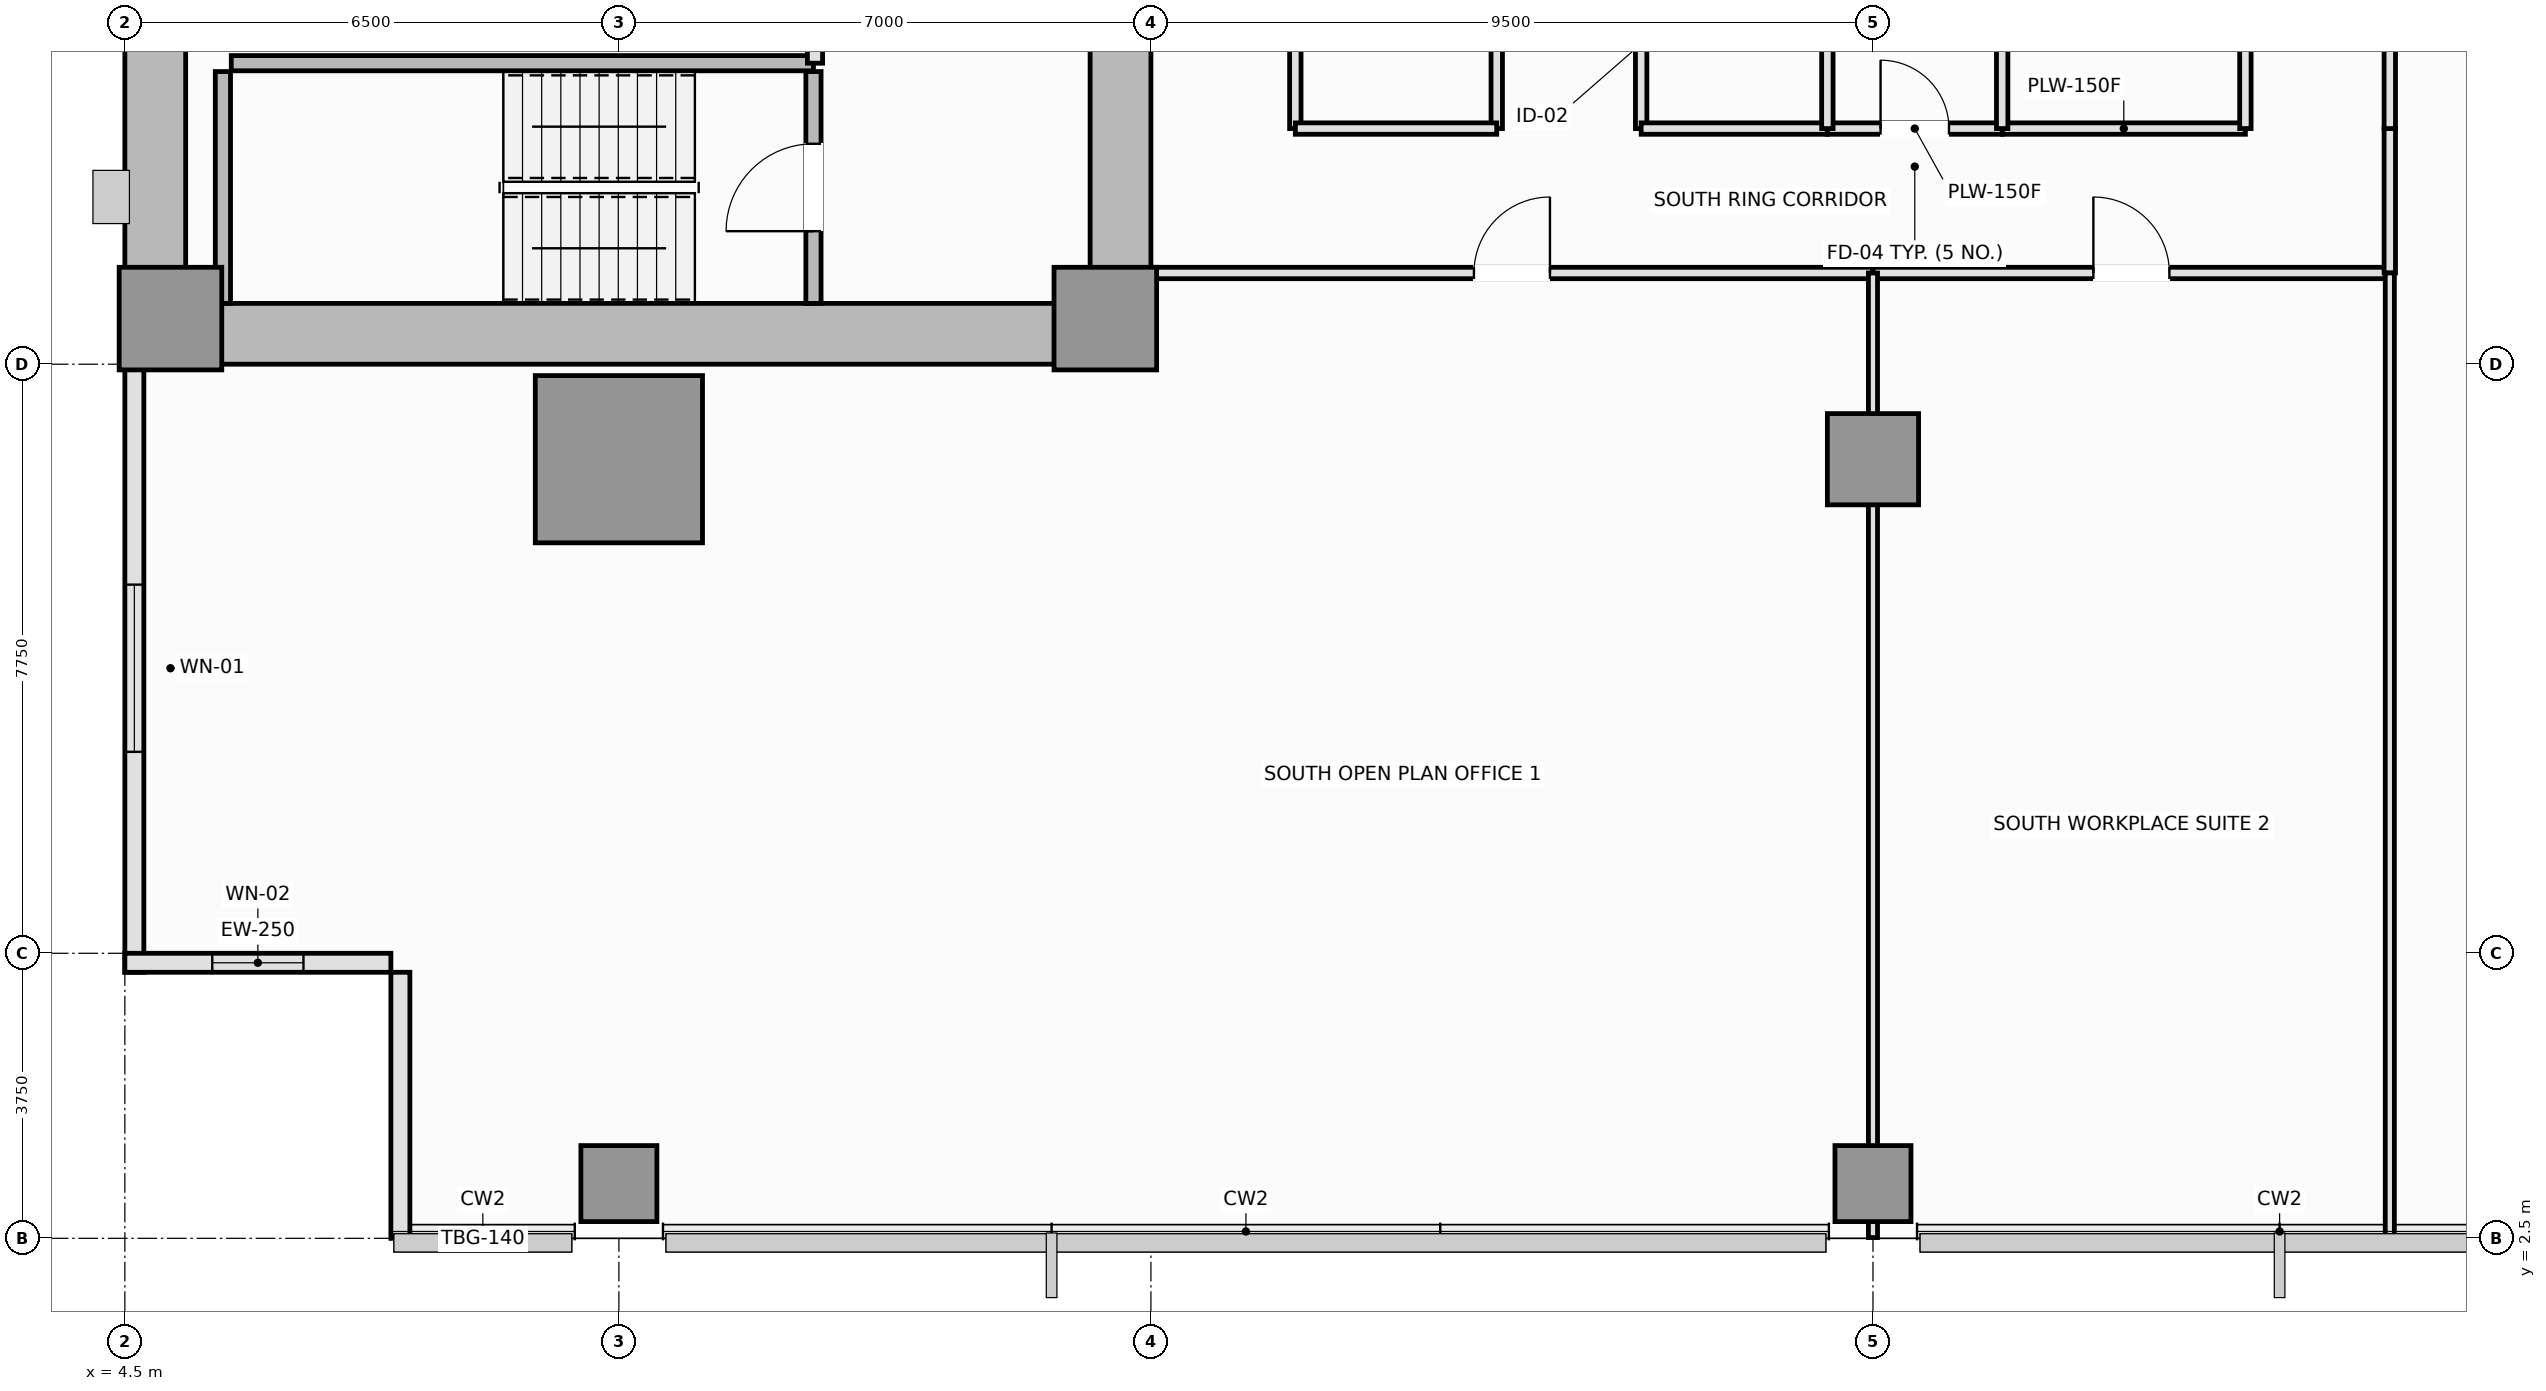
"""IFC4 building model, lengths in metres.
Left out: names, types, materials, properties, quantities, classifications, styles, units other than length and angle.
Written with IfcOpenShell. Run it as: python <this file> out.ifc"""

import sys

from ifc_helpers import new_model, si_unit, direction, frame, frame_2d, origin, origin_2d, place, context, subcontext, project, spatial, rectangle, extrude, element, fill, save


model = new_model("IFC4")
c1 = context("Model", 3, precision=1e-05, world=origin(), true_north=direction((0.0, 1.0)))
c2 = subcontext(c1, "Body", "Model", "MODEL_VIEW")
j1 = project(units=[si_unit("LENGTHUNIT", "METRE"), si_unit("PLANEANGLEUNIT", "RADIAN")], contexts=[c1])
p1 = place(None, origin())
s1 = spatial("IfcSite", under=j1, at=p1, CompositionType="ELEMENT")
p2 = place(p1, origin())
s2 = spatial("IfcBuilding", under=s1, at=p2, CompositionType="ELEMENT")
p3 = place(p2, frame((0.0, 0.0, 39.8)))
s3 = spatial("IfcBuildingStorey", under=s2, at=p3, CompositionType="ELEMENT", Elevation=39.8)
p4 = place(p3, frame((4.5, 14.4, 0.0), z_axis=(0.0, 0.0, 1.0), x_axis=(1.0, 0.0, 0.0)))
e1 = element("IfcWall", 1, at=p4, inside=s3, PredefinedType="SHEAR", context=c2, shape_type="SweptSolid", body=[
    extrude(rectangle(XDim=13.5, YDim=0.8, at=frame_2d((6.75, 0.0))), origin(), (0.0, 0.0, 1.0), 3.55),
])
p5 = place(p3, frame((4.9, 14.8, 0.0), z_axis=(0.0, 0.0, 1.0), x_axis=(0.0, 1.0, 0.0)))
e2 = element("IfcWall", 2, at=p5, inside=s3, PredefinedType="SHEAR", context=c2, shape_type="SweptSolid", body=[
    extrude(rectangle(XDim=20.9, YDim=0.8, at=frame_2d((10.45, 0.0))), origin(), (0.0, 0.0, 1.0), 3.55),
])
p6 = place(p3, frame((17.6, 14.8, 0.0), z_axis=(0.0, 0.0, 1.0), x_axis=(0.0, 1.0, 0.0)))
e3 = element("IfcWall", 3, at=p6, inside=s3, PredefinedType="SHEAR", context=c2, shape_type="SweptSolid", body=[
    extrude(rectangle(XDim=8.65, YDim=0.8, at=frame_2d((4.325, 0.0))), origin(), (0.0, 0.0, 1.0), 3.55),
])
p7 = place(p6, frame((4.1, 0.0, 0.0)))
e4 = element("IfcOpeningElement", 4, at=p7, cuts=e3, PredefinedType="OPENING", context=c2, shape_type="SweptSolid", body=[
    extrude(rectangle(XDim=1.1, YDim=2.15, at=frame_2d((0.55, 1.075))), frame((0.0, 0.41, 0.0), z_axis=(0.0, -1.0, 0.0), x_axis=(1.0, 0.0, 0.0)), (0.0, 0.0, 1.0), 0.82),
])
for number, where, z_axis, x_axis in (
    (5, (5.1, 14.6, 0.0), (0.0, 0.0, 1.0), (1.0, 0.0, 0.0)),
    (6, (17.4, 14.6, 0.0), (0.0, 0.0, 1.0), (1.0, 0.0, 0.0)),
):
    element("IfcColumn", number, at=place(p3, frame(where, z_axis=z_axis, x_axis=x_axis)), inside=s3, PredefinedType="PILASTER", context=c2, shape_type="SweptSolid", body=[
        extrude(rectangle(XDim=1.35, YDim=1.35, at=origin_2d()), origin(), (0.0, 0.0, 1.0), 3.55),
    ])
p8 = place(p3, frame((11.0, 12.75, 0.0), z_axis=(0.0, 0.0, 1.0), x_axis=(1.0, 0.0, 0.0)))
e7 = element("IfcColumn", 7, at=p8, inside=s3, PredefinedType="COLUMN", context=c2, shape_type="SweptSolid", body=[
    extrude(rectangle(XDim=2.2, YDim=2.2, at=origin_2d()), origin(), (0.0, 0.0, 1.0), 3.55),
])
p9 = place(p3, frame((27.5, 12.75, 0.0), z_axis=(0.0, 0.0, 1.0), x_axis=(1.0, 0.0, 0.0)))
e8 = element("IfcColumn", 8, at=p9, inside=s3, PredefinedType="COLUMN", context=c2, shape_type="SweptSolid", body=[
    extrude(rectangle(XDim=1.2, YDim=1.2, at=origin_2d()), origin(), (0.0, 0.0, 1.0), 3.55),
])
for number, where, z_axis, x_axis in (
    (9, (11.0, 3.22, 0.0), (0.0, 0.0, 1.0), (1.0, 0.0, 0.0)),
    (10, (27.5, 3.22, 0.0), (0.0, 0.0, 1.0), (1.0, 0.0, 0.0)),
):
    element("IfcColumn", number, at=place(p3, frame(where, z_axis=z_axis, x_axis=x_axis)), inside=s3, PredefinedType="COLUMN", context=c2, shape_type="SweptSolid", body=[
        extrude(rectangle(XDim=1.0, YDim=1.0, at=origin_2d()), origin(), (0.0, 0.0, 1.0), 3.55),
    ])
p10 = place(p3, frame((4.625, 14.0, 0.0), z_axis=(0.0, 0.0, 1.0), x_axis=(0.0, -1.0, 0.0)))
e11 = element("IfcWall", 11, at=p10, inside=s3, PredefinedType="SOLIDWALL", context=c2, shape_type="SweptSolid", body=[
    extrude(rectangle(XDim=8.0, YDim=0.25, at=frame_2d((4.0, 0.0))), origin(), (0.0, 0.0, 1.0), 3.37),
])
p11 = place(p10, frame((2.9, 0.0, 0.9)))
e12 = element("IfcOpeningElement", 12, at=p11, cuts=e11, PredefinedType="OPENING", context=c2, shape_type="SweptSolid", body=[
    extrude(rectangle(XDim=2.2, YDim=1.8, at=frame_2d((1.1, 0.9))), frame((0.0, 0.135, 0.0), z_axis=(0.0, -1.0, 0.0), x_axis=(1.0, 0.0, 0.0)), (0.0, 0.0, 1.0), 0.27),
])
p12 = place(p3, frame((4.5, 6.125, 0.0), z_axis=(0.0, 0.0, 1.0), x_axis=(1.0, 0.0, 0.0)))
e13 = element("IfcWall", 13, at=p12, inside=s3, PredefinedType="SOLIDWALL", context=c2, shape_type="SweptSolid", body=[
    extrude(rectangle(XDim=3.5, YDim=0.25, at=frame_2d((1.75, 0.0))), origin(), (0.0, 0.0, 1.0), 3.37),
])
p13 = place(p12, frame((1.15, 0.0, 0.9)))
e14 = element("IfcOpeningElement", 14, at=p13, cuts=e13, PredefinedType="OPENING", context=c2, shape_type="SweptSolid", body=[
    extrude(rectangle(XDim=1.2, YDim=1.8, at=frame_2d((0.6, 0.9))), frame((0.0, 0.135, 0.0), z_axis=(0.0, -1.0, 0.0), x_axis=(1.0, 0.0, 0.0)), (0.0, 0.0, 1.0), 0.27),
])
p14 = place(p3, frame((8.125, 6.0, 0.0), z_axis=(0.0, 0.0, 1.0), x_axis=(0.0, -1.0, 0.0)))
e15 = element("IfcWall", 15, at=p14, inside=s3, PredefinedType="SOLIDWALL", context=c2, shape_type="SweptSolid", body=[
    extrude(rectangle(XDim=3.5, YDim=0.25, at=frame_2d((1.75, 0.0))), origin(), (0.0, 0.0, 1.0), 3.37),
])
p15 = place(p3, frame((5.79, 14.8, 0.0), z_axis=(0.0, 0.0, 1.0), x_axis=(0.0, 1.0, 0.0)))
e16 = element("IfcWall", 16, at=p15, inside=s3, PredefinedType="SOLIDWALL", context=c2, shape_type="SweptSolid", body=[
    extrude(rectangle(XDim=3.05, YDim=0.2, at=frame_2d((1.525, 0.0))), origin(), (0.0, 0.0, 1.0), 3.55),
])
p16 = place(p3, frame((5.9, 17.96, 0.0), z_axis=(0.0, 0.0, 1.0), x_axis=(1.0, 0.0, 0.0)))
e17 = element("IfcWall", 17, at=p16, inside=s3, PredefinedType="SOLIDWALL", context=c2, shape_type="SweptSolid", body=[
    extrude(rectangle(XDim=7.66, YDim=0.2, at=frame_2d((3.83, 0.0))), origin(), (0.0, 0.0, 1.0), 3.55),
])
p17 = place(p3, frame((13.56, 14.8, 0.0), z_axis=(0.0, 0.0, 1.0), x_axis=(0.0, 1.0, 0.0)))
e18 = element("IfcWall", 18, at=p17, inside=s3, PredefinedType="SOLIDWALL", context=c2, shape_type="SweptSolid", body=[
    extrude(rectangle(XDim=3.05, YDim=0.2, at=frame_2d((1.525, 0.0))), origin(), (0.0, 0.0, 1.0), 3.55),
])
p18 = place(p17, frame((0.95, 0.0, 0.0)))
e19 = element("IfcOpeningElement", 19, at=p18, cuts=e18, PredefinedType="OPENING", context=c2, shape_type="SweptSolid", body=[
    extrude(rectangle(XDim=1.15, YDim=2.15, at=frame_2d((0.575, 1.075))), frame((0.0, 0.11, 0.0), z_axis=(0.0, -1.0, 0.0), x_axis=(1.0, 0.0, 0.0)), (0.0, 0.0, 1.0), 0.22),
])
p19 = place(p3, frame((13.58, 17.96, 0.0), z_axis=(0.0, 0.0, 1.0), x_axis=(0.0, 1.0, 0.0)))
e20 = element("IfcWall", 20, at=p19, inside=s3, PredefinedType="PARTITIONING", context=c2, shape_type="SweptSolid", body=[
    extrude(rectangle(XDim=0.54, YDim=0.2, at=frame_2d((0.27, 0.0))), origin(), (0.0, 0.0, 1.0), 3.37),
])
p20 = place(p3, frame((22.55, 17.1, 0.0), z_axis=(0.0, 0.0, 1.0), x_axis=(0.0, 1.0, 0.0)))
e21 = element("IfcWall", 21, at=p20, inside=s3, PredefinedType="PARTITIONING", context=c2, shape_type="SweptSolid", body=[
    extrude(rectangle(XDim=3.65, YDim=0.15, at=frame_2d((1.825, 0.0))), origin(), (0.0, 0.0, 1.0), 3.01),
])
p21 = place(p20, frame((1.325, 0.0, 0.0)))
e22 = element("IfcOpeningElement", 22, at=p21, cuts=e21, PredefinedType="OPENING", context=c2, shape_type="SweptSolid", body=[
    extrude(rectangle(XDim=1.0, YDim=2.15, at=frame_2d((0.5, 1.075))), frame((0.0, 0.085, 0.0), z_axis=(0.0, -1.0, 0.0), x_axis=(1.0, 0.0, 0.0)), (0.0, 0.0, 1.0), 0.17),
])
p22 = place(p3, frame((24.45, 17.1, 0.0), z_axis=(0.0, 0.0, 1.0), x_axis=(0.0, 1.0, 0.0)))
e23 = element("IfcWall", 23, at=p22, inside=s3, PredefinedType="PARTITIONING", context=c2, shape_type="SweptSolid", body=[
    extrude(rectangle(XDim=3.1, YDim=0.15, at=frame_2d((1.55, 0.0))), origin(), (0.0, 0.0, 1.0), 3.37),
])
p23 = place(p22, frame((1.05, 0.0, 0.0)))
e24 = element("IfcOpeningElement", 24, at=p23, cuts=e23, PredefinedType="OPENING", context=c2, shape_type="SweptSolid", body=[
    extrude(rectangle(XDim=1.0, YDim=2.15, at=frame_2d((0.5, 1.075))), frame((0.0, 0.085, 0.0), z_axis=(0.0, -1.0, 0.0), x_axis=(1.0, 0.0, 0.0)), (0.0, 0.0, 1.0), 0.17),
])
p24 = place(p3, frame((19.9, 17.1, 0.0), z_axis=(0.0, 0.0, 1.0), x_axis=(0.0, 1.0, 0.0)))
e25 = element("IfcWall", 25, at=p24, inside=s3, PredefinedType="PARTITIONING", context=c2, shape_type="SweptSolid", body=[
    extrude(rectangle(XDim=3.65, YDim=0.15, at=frame_2d((1.825, 0.0))), origin(), (0.0, 0.0, 1.0), 3.37),
])
p25 = place(p3, frame((19.9, 17.1, 0.0), z_axis=(0.0, 0.0, 1.0), x_axis=(1.0, 0.0, 0.0)))
e26 = element("IfcWall", 26, at=p25, inside=s3, PredefinedType="PARTITIONING", context=c2, shape_type="SweptSolid", body=[
    extrude(rectangle(XDim=2.65, YDim=0.15, at=frame_2d((1.325, 0.0))), origin(), (0.0, 0.0, 1.0), 3.37),
])
p26 = place(p3, frame((29.2, 17.1, 0.0), z_axis=(0.0, 0.0, 1.0), x_axis=(1.0, 0.0, 0.0)))
e27 = element("IfcWall", 27, at=p26, inside=s3, PredefinedType="PLUMBINGWALL", context=c2, shape_type="SweptSolid", body=[
    extrude(rectangle(XDim=3.2, YDim=0.15, at=frame_2d((1.6, 0.0))), origin(), (0.0, 0.0, 1.0), 3.37),
])
p27 = place(p3, frame((26.9, 17.1, 0.0), z_axis=(0.0, 0.0, 1.0), x_axis=(1.0, 0.0, 0.0)))
e28 = element("IfcWall", 28, at=p27, inside=s3, PredefinedType="PLUMBINGWALL", context=c2, shape_type="SweptSolid", body=[
    extrude(rectangle(XDim=2.3, YDim=0.15, at=frame_2d((1.15, 0.0))), origin(), (0.0, 0.0, 1.0), 3.37),
])
p28 = place(p27, frame((0.7, 0.0, 0.0)))
e29 = element("IfcOpeningElement", 29, at=p28, cuts=e28, PredefinedType="OPENING", context=c2, shape_type="SweptSolid", body=[
    extrude(rectangle(XDim=0.9, YDim=2.1, at=frame_2d((0.45, 1.05))), frame((0.0, 0.085, 0.0), z_axis=(0.0, -1.0, 0.0), x_axis=(1.0, 0.0, 0.0)), (0.0, 0.0, 1.0), 0.17),
])
p29 = place(p3, frame((24.45, 17.1, 0.0), z_axis=(0.0, 0.0, 1.0), x_axis=(1.0, 0.0, 0.0)))
e30 = element("IfcWall", 30, at=p29, inside=s3, PredefinedType="PARTITIONING", context=c2, shape_type="SweptSolid", body=[
    extrude(rectangle(XDim=2.45, YDim=0.15, at=frame_2d((1.225, 0.0))), origin(), (0.0, 0.0, 1.0), 3.37),
])
p30 = place(p3, frame((18.0, 15.2, 0.0), z_axis=(0.0, 0.0, 1.0), x_axis=(1.0, 0.0, 0.0)))
e31 = element("IfcWall", 31, at=p30, inside=s3, PredefinedType="PARTITIONING", context=c2, shape_type="SweptSolid", body=[
    extrude(rectangle(XDim=9.5, YDim=0.15, at=frame_2d((4.75, 0.0))), origin(), (0.0, 0.0, 1.0), 3.37),
])
p31 = place(p30, frame((4.25, 0.0, 0.0)))
e32 = element("IfcOpeningElement", 32, at=p31, cuts=e31, PredefinedType="OPENING", context=c2, shape_type="SweptSolid", body=[
    extrude(rectangle(XDim=1.0, YDim=2.15, at=frame_2d((0.5, 1.075))), frame((0.0, 0.085, 0.0), z_axis=(0.0, -1.0, 0.0), x_axis=(1.0, 0.0, 0.0)), (0.0, 0.0, 1.0), 0.17),
])
p32 = place(p3, frame((27.5, 15.2, 0.0), z_axis=(0.0, 0.0, 1.0), x_axis=(1.0, 0.0, 0.0)))
e33 = element("IfcWall", 33, at=p32, inside=s3, PredefinedType="PARTITIONING", context=c2, shape_type="SweptSolid", body=[
    extrude(rectangle(XDim=6.8, YDim=0.15, at=frame_2d((3.4, 0.0))), origin(), (0.0, 0.0, 1.0), 3.37),
])
p33 = place(p32, frame((2.9, 0.0, 0.0)))
e34 = element("IfcOpeningElement", 34, at=p33, cuts=e33, PredefinedType="OPENING", context=c2, shape_type="SweptSolid", body=[
    extrude(rectangle(XDim=1.0, YDim=2.15, at=frame_2d((0.5, 1.075))), frame((0.0, 0.085, 0.0), z_axis=(0.0, -1.0, 0.0), x_axis=(1.0, 0.0, 0.0)), (0.0, 0.0, 1.0), 0.17),
])
p34 = place(p3, frame((34.3, 15.2, 0.0), z_axis=(0.0, 0.0, 1.0), x_axis=(0.0, 1.0, 0.0)))
e35 = element("IfcWall", 35, at=p34, inside=s3, PredefinedType="PARTITIONING", context=c2, shape_type="SweptSolid", body=[
    extrude(rectangle(XDim=1.9, YDim=0.15, at=frame_2d((0.95, 0.0))), origin(), (0.0, 0.0, 1.0), 3.37),
])
p35 = place(p3, frame((32.4, 17.1, 0.0), z_axis=(0.0, 0.0, 1.0), x_axis=(0.0, 1.0, 0.0)))
e36 = element("IfcWall", 36, at=p35, inside=s3, PredefinedType="PLUMBINGWALL", context=c2, shape_type="SweptSolid", body=[
    extrude(rectangle(XDim=3.1, YDim=0.15, at=frame_2d((1.55, 0.0))), origin(), (0.0, 0.0, 1.0), 3.37),
])
p36 = place(p35, frame((1.1, 0.0, 0.0)))
e37 = element("IfcOpeningElement", 37, at=p36, cuts=e36, PredefinedType="OPENING", context=c2, shape_type="SweptSolid", body=[
    extrude(rectangle(XDim=0.9, YDim=2.1, at=frame_2d((0.45, 1.05))), frame((0.0, 0.085, 0.0), z_axis=(0.0, -1.0, 0.0), x_axis=(1.0, 0.0, 0.0)), (0.0, 0.0, 1.0), 0.17),
])
p37 = place(p3, frame((34.3, 17.1, 0.0), z_axis=(0.0, 0.0, 1.0), x_axis=(0.0, 1.0, 0.0)))
e38 = element("IfcWall", 38, at=p37, inside=s3, PredefinedType="PARTITIONING", context=c2, shape_type="SweptSolid", body=[
    extrude(rectangle(XDim=8.15, YDim=0.15, at=frame_2d((4.075, 0.0))), origin(), (0.0, 0.0, 1.0), 3.37),
])
p38 = place(p37, frame((3.575, 0.0, 0.0)))
e39 = element("IfcOpeningElement", 39, at=p38, cuts=e38, PredefinedType="OPENING", context=c2, shape_type="SweptSolid", body=[
    extrude(rectangle(XDim=1.0, YDim=2.15, at=frame_2d((0.5, 1.075))), frame((0.0, 0.085, 0.0), z_axis=(0.0, -1.0, 0.0), x_axis=(1.0, 0.0, 0.0)), (0.0, 0.0, 1.0), 0.17),
])
for number, where, z_axis, x_axis in (
    (40, (29.2, 17.1, 0.0), (0.0, 0.0, 1.0), (0.0, 1.0, 0.0)),
    (41, (26.9, 17.1, 0.0), (0.0, 0.0, 1.0), (0.0, 1.0, 0.0)),
):
    element("IfcWall", number, at=place(p3, frame(where, z_axis=z_axis, x_axis=x_axis)), inside=s3, PredefinedType="PLUMBINGWALL", context=c2, shape_type="SweptSolid", body=[
        extrude(rectangle(XDim=3.1, YDim=0.15, at=frame_2d((1.55, 0.0))), origin(), (0.0, 0.0, 1.0), 3.37),
    ])
p39 = place(p3, frame((27.5, 2.51, 0.0), z_axis=(0.0, 0.0, 1.0), x_axis=(0.0, 1.0, 0.0)))
e42 = element("IfcWall", 42, at=p39, inside=s3, PredefinedType="PARTITIONING", context=c2, shape_type="SweptSolid", body=[
    extrude(rectangle(XDim=12.69, YDim=0.12, at=frame_2d((6.345, 0.0))), origin(), (0.0, 0.0, 1.0), 2.82),
])
p40 = place(p3, frame((34.3, 2.51, 0.0), z_axis=(0.0, 0.0, 1.0), x_axis=(0.0, 1.0, 0.0)))
e43 = element("IfcWall", 43, at=p40, inside=s3, PredefinedType="PARTITIONING", context=c2, shape_type="SweptSolid", body=[
    extrude(rectangle(XDim=12.69, YDim=0.12, at=frame_2d((6.345, 0.0))), origin(), (0.0, 0.0, 1.0), 3.37),
])
p41 = place(p11, origin())
e44 = element("IfcWindow", 44, at=p41, inside=s3, PartitioningType="SINGLE_PANEL", PredefinedType="WINDOW", context=c2, shape_type="SweptSolid", body=[
    extrude(rectangle(XDim=2.2, YDim=1.8, at=frame_2d((1.1, 0.9))), frame((0.0, 0.03, 0.0), z_axis=(0.0, -1.0, 0.0), x_axis=(1.0, 0.0, 0.0)), (0.0, 0.0, 1.0), 0.06),
])
fill(e12, e44)
p42 = place(p13, origin())
e45 = element("IfcWindow", 45, at=p42, inside=s3, PartitioningType="SINGLE_PANEL", PredefinedType="WINDOW", context=c2, shape_type="SweptSolid", body=[
    extrude(rectangle(XDim=1.2, YDim=1.8, at=frame_2d((0.6, 0.9))), frame((0.0, 0.03, 0.0), z_axis=(0.0, -1.0, 0.0), x_axis=(1.0, 0.0, 0.0)), (0.0, 0.0, 1.0), 0.06),
])
fill(e14, e45)
p43 = place(p18, origin())
e46 = element("IfcDoor", 46, at=p43, inside=s3, OperationType="SINGLE_SWING_LEFT", PredefinedType="DOOR", context=c2, shape_type="SweptSolid", body=[
    extrude(rectangle(XDim=1.15, YDim=2.15, at=frame_2d((0.575, 1.075))), frame((0.0, 0.025, 0.0), z_axis=(0.0, -1.0, 0.0), x_axis=(1.0, 0.0, 0.0)), (0.0, 0.0, 1.0), 0.05),
])
fill(e19, e46)
p44 = place(p28, origin())
e47 = element("IfcDoor", 47, at=p44, inside=s3, OperationType="SINGLE_SWING_LEFT", PredefinedType="DOOR", context=c2, shape_type="SweptSolid", body=[
    extrude(rectangle(XDim=0.9, YDim=2.1, at=frame_2d((0.45, 1.05))), frame((0.0, 0.025, 0.0), z_axis=(0.0, -1.0, 0.0), x_axis=(1.0, 0.0, 0.0)), (0.0, 0.0, 1.0), 0.05),
])
fill(e29, e47)
p45 = place(p31, origin())
e48 = element("IfcDoor", 48, at=p45, inside=s3, OperationType="SINGLE_SWING_RIGHT", PredefinedType="DOOR", context=c2, shape_type="SweptSolid", body=[
    extrude(rectangle(XDim=1.0, YDim=2.15, at=frame_2d((0.5, 1.075))), frame((0.0, 0.025, 0.0), z_axis=(0.0, -1.0, 0.0), x_axis=(1.0, 0.0, 0.0)), (0.0, 0.0, 1.0), 0.05),
])
fill(e32, e48)
p46 = place(p33, origin())
e49 = element("IfcDoor", 49, at=p46, inside=s3, OperationType="SINGLE_SWING_LEFT", PredefinedType="DOOR", context=c2, shape_type="SweptSolid", body=[
    extrude(rectangle(XDim=1.0, YDim=2.15, at=frame_2d((0.5, 1.075))), frame((0.0, 0.025, 0.0), z_axis=(0.0, -1.0, 0.0), x_axis=(1.0, 0.0, 0.0)), (0.0, 0.0, 1.0), 0.05),
])
fill(e34, e49)
save(model, sys.argv[1])
